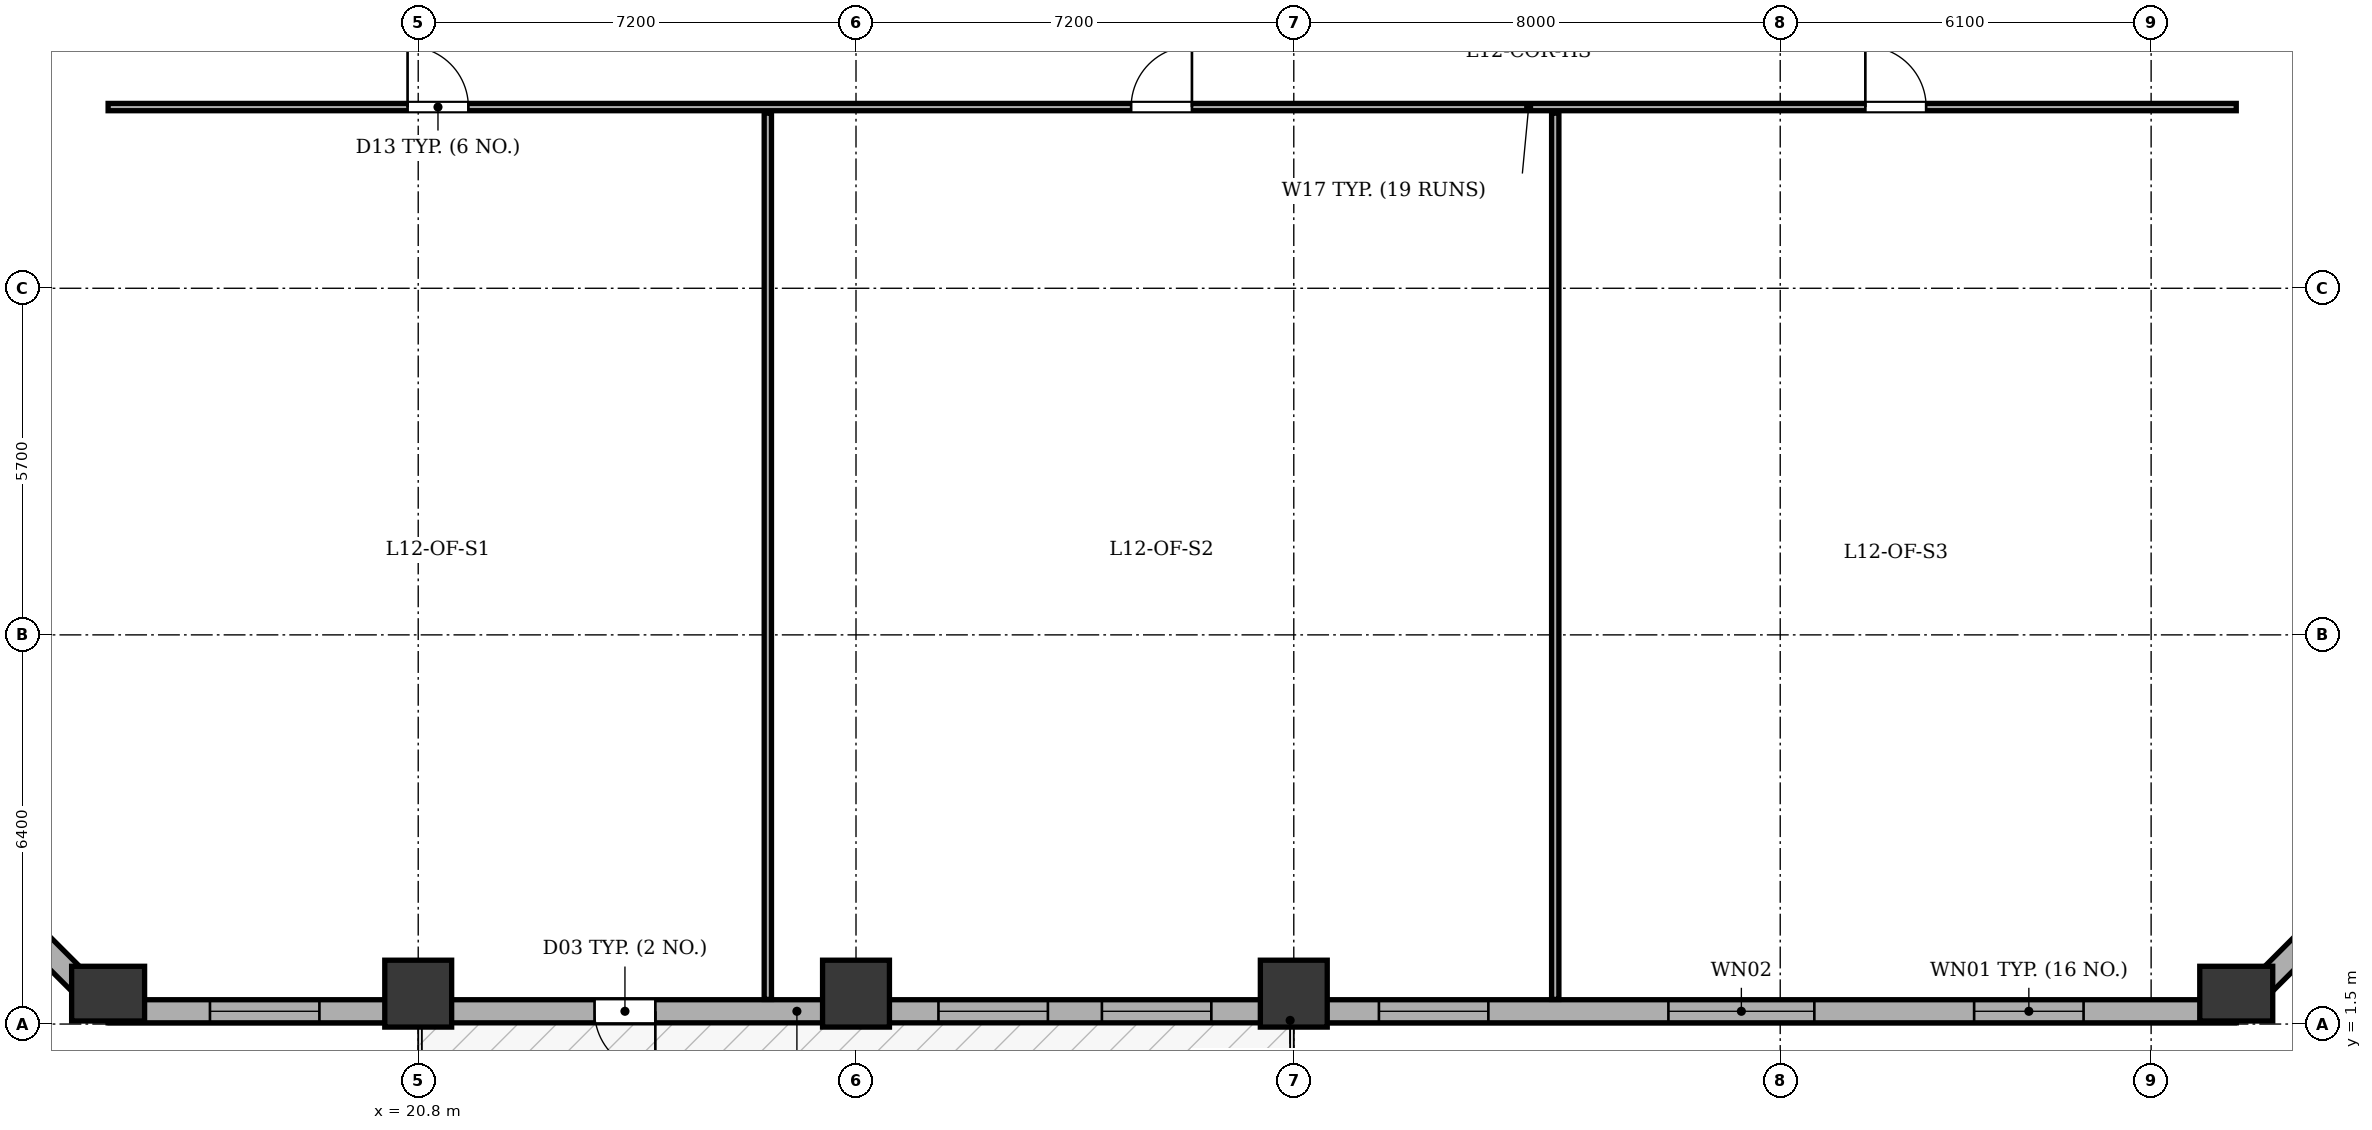
"""IFC4 building model, lengths in metres.
Left out: names, types, materials, properties, quantities, classifications, styles, units other than length and angle.
Written with IfcOpenShell. Run it as: python <this file> out.ifc"""

import sys

from ifc_helpers import new_model, si_unit, direction, frame, frame_2d, origin, origin_2d, place, context, subcontext, project, spatial, rectangle, extrude, element, fill, save


model = new_model("IFC4")
c1 = context("Model", 3, precision=1e-05, world=origin(), true_north=direction((0.0, 1.0)))
c2 = subcontext(c1, "Body", "Model", "MODEL_VIEW")
j1 = project(units=[si_unit("LENGTHUNIT", "METRE"), si_unit("PLANEANGLEUNIT", "RADIAN")], contexts=[c1])
p1 = place(None, origin())
s1 = spatial("IfcSite", under=j1, at=p1, CompositionType="ELEMENT")
p2 = place(p1, origin())
s2 = spatial("IfcBuilding", under=s1, at=p2, CompositionType="ELEMENT")
p3 = place(p2, frame((0.0, 0.0, 51.6)))
s3 = spatial("IfcBuildingStorey", under=s2, at=p3, CompositionType="ELEMENT", Elevation=51.6)
p4 = place(p3, frame((15.7, 2.0, 0.0), z_axis=(0.0, 0.0, 1.0), x_axis=(1.0, 0.0, 0.0)))
e1 = element("IfcColumn", 1, at=p4, inside=s3, PredefinedType="COLUMN", context=c2, shape_type="SweptSolid", body=[
    extrude(rectangle(XDim=0.9, YDim=1.2, at=origin_2d()), origin(), (0.0, 0.0, 1.0), 3.9),
])
for number, where, z_axis, x_axis in (
    (2, (20.8, 2.0, 0.0), (0.0, 0.0, 1.0), (1.0, 0.0, 0.0)),
    (3, (28.0, 2.0, 0.0), (0.0, 0.0, 1.0), (1.0, 0.0, 0.0)),
    (4, (35.2, 2.0, 0.0), (0.0, 0.0, 1.0), (1.0, 0.0, 0.0)),
):
    element("IfcColumn", number, at=place(p3, frame(where, z_axis=z_axis, x_axis=x_axis)), inside=s3, PredefinedType="COLUMN", context=c2, shape_type="SweptSolid", body=[
        extrude(rectangle(XDim=1.1, YDim=1.1, at=origin_2d()), origin(), (0.0, 0.0, 1.0), 3.9),
    ])
p5 = place(p3, frame((50.7, 2.0, 0.0), z_axis=(0.0, 0.0, 1.0), x_axis=(1.0, 0.0, 0.0)))
e5 = element("IfcColumn", 5, at=p5, inside=s3, PredefinedType="COLUMN", context=c2, shape_type="SweptSolid", body=[
    extrude(rectangle(XDim=0.9, YDim=1.2, at=origin_2d()), origin(), (0.0, 0.0, 1.0), 3.9),
])
p6 = place(p3, frame((50.7, 1.71, 0.0), z_axis=(0.0, 0.0, 1.0), x_axis=(-1.0, 0.0, 0.0)))
e6 = element("IfcWall", 6, at=p6, inside=s3, PredefinedType="STANDARD", context=c2, shape_type="SweptSolid", body=[
    extrude(rectangle(XDim=35.0, YDim=0.38, at=frame_2d((17.5, 0.0))), origin(), (0.0, 0.0, 1.0), 3.135),
])
p7 = place(p6, frame((26.0, 0.0, 0.0)))
e7 = element("IfcOpeningElement", 7, at=p7, cuts=e6, PredefinedType="OPENING", context=c2, shape_type="SweptSolid", body=[
    extrude(rectangle(XDim=1.0, YDim=2.02, at=frame_2d((0.5, 1.01))), frame((0.0, 0.2, 0.0), z_axis=(0.0, -1.0, 0.0), x_axis=(1.0, 0.0, 0.0)), (0.0, 0.0, 1.0), 0.4),
])
p8 = place(p6, frame((2.511, 0.0, 0.8)))
e8 = element("IfcOpeningElement", 8, at=p8, cuts=e6, PredefinedType="OPENING", context=c2, shape_type="SweptSolid", body=[
    extrude(rectangle(XDim=1.8, YDim=1.9, at=frame_2d((0.9, 0.95))), frame((0.0, 0.2, 0.0), z_axis=(0.0, -1.0, 0.0), x_axis=(1.0, 0.0, 0.0)), (0.0, 0.0, 1.0), 0.4),
])
p9 = place(p6, frame((6.939, 0.0, 0.8)))
e9 = element("IfcOpeningElement", 9, at=p9, cuts=e6, PredefinedType="OPENING", context=c2, shape_type="SweptSolid", body=[
    extrude(rectangle(XDim=2.4, YDim=1.9, at=frame_2d((1.2, 0.95))), frame((0.0, 0.2, 0.0), z_axis=(0.0, -1.0, 0.0), x_axis=(1.0, 0.0, 0.0)), (0.0, 0.0, 1.0), 0.4),
])
p10 = place(p6, frame((12.3, 0.0, 0.8)))
e10 = element("IfcOpeningElement", 10, at=p10, cuts=e6, PredefinedType="OPENING", context=c2, shape_type="SweptSolid", body=[
    extrude(rectangle(XDim=1.8, YDim=1.9, at=frame_2d((0.9, 0.95))), frame((0.0, 0.2, 0.0), z_axis=(0.0, -1.0, 0.0), x_axis=(1.0, 0.0, 0.0)), (0.0, 0.0, 1.0), 0.4),
])
p11 = place(p6, frame((16.856, 0.0, 0.8)))
e11 = element("IfcOpeningElement", 11, at=p11, cuts=e6, PredefinedType="OPENING", context=c2, shape_type="SweptSolid", body=[
    extrude(rectangle(XDim=1.8, YDim=1.9, at=frame_2d((0.9, 0.95))), frame((0.0, 0.2, 0.0), z_axis=(0.0, -1.0, 0.0), x_axis=(1.0, 0.0, 0.0)), (0.0, 0.0, 1.0), 0.4),
])
p12 = place(p6, frame((19.544, 0.0, 0.8)))
e12 = element("IfcOpeningElement", 12, at=p12, cuts=e6, PredefinedType="OPENING", context=c2, shape_type="SweptSolid", body=[
    extrude(rectangle(XDim=1.8, YDim=1.9, at=frame_2d((0.9, 0.95))), frame((0.0, 0.2, 0.0), z_axis=(0.0, -1.0, 0.0), x_axis=(1.0, 0.0, 0.0)), (0.0, 0.0, 1.0), 0.4),
])
p13 = place(p6, frame((31.525, 0.0, 0.8)))
e13 = element("IfcOpeningElement", 13, at=p13, cuts=e6, PredefinedType="OPENING", context=c2, shape_type="SweptSolid", body=[
    extrude(rectangle(XDim=1.8, YDim=1.9, at=frame_2d((0.9, 0.95))), frame((0.0, 0.2, 0.0), z_axis=(0.0, -1.0, 0.0), x_axis=(1.0, 0.0, 0.0)), (0.0, 0.0, 1.0), 0.4),
])
p14 = place(p3, frame((15.7, 1.71, 0.0), z_axis=(0.0, 0.0, 1.0), x_axis=(-0.707106781187, 0.707106781187, 0.0)))
e14 = element("IfcWall", 14, at=p14, inside=s3, PredefinedType="STANDARD", context=c2, shape_type="SweptSolid", body=[
    extrude(rectangle(XDim=6.774, YDim=0.38, at=frame_2d((3.387, 0.0))), origin(), (0.0, 0.0, 1.0), 3.135),
])
p15 = place(p14, frame((2.687, 0.0, 0.8)))
e15 = element("IfcOpeningElement", 15, at=p15, cuts=e14, PredefinedType="OPENING", context=c2, shape_type="SweptSolid", body=[
    extrude(rectangle(XDim=1.4, YDim=1.65, at=frame_2d((0.7, 0.825))), frame((0.0, 0.2, 0.0), z_axis=(0.0, -1.0, 0.0), x_axis=(1.0, 0.0, 0.0)), (0.0, 0.0, 1.0), 0.4),
])
p16 = place(p3, frame((55.49, 6.5, 0.0), z_axis=(0.0, 0.0, 1.0), x_axis=(-0.707106781187, -0.707106781187, 0.0)))
e16 = element("IfcWall", 16, at=p16, inside=s3, PredefinedType="STANDARD", context=c2, shape_type="SweptSolid", body=[
    extrude(rectangle(XDim=6.774, YDim=0.38, at=frame_2d((3.387, 0.0))), origin(), (0.0, 0.0, 1.0), 3.135),
])
p17 = place(p16, frame((2.687, 0.0, 0.8)))
e17 = element("IfcOpeningElement", 17, at=p17, cuts=e16, PredefinedType="OPENING", context=c2, shape_type="SweptSolid", body=[
    extrude(rectangle(XDim=1.4, YDim=1.65, at=frame_2d((0.7, 0.825))), frame((0.0, 0.2, 0.0), z_axis=(0.0, -1.0, 0.0), x_axis=(1.0, 0.0, 0.0)), (0.0, 0.0, 1.0), 0.4),
])
p18 = place(p3, frame((15.7, 16.58, 0.0), z_axis=(0.0, 0.0, 1.0), x_axis=(1.0, 0.0, 0.0)))
e18 = element("IfcWall", 18, at=p18, inside=s3, PredefinedType="PARTITIONING", context=c2, shape_type="SweptSolid", body=[
    extrude(rectangle(XDim=35.0, YDim=0.12, at=frame_2d((17.5, 0.0))), origin(), (0.0, 0.0, 1.0), 3.6),
])
p19 = place(p18, frame((4.925, 0.0, 0.0)))
e19 = element("IfcOpeningElement", 19, at=p19, cuts=e18, PredefinedType="OPENING", context=c2, shape_type="SweptSolid", body=[
    extrude(rectangle(XDim=1.0, YDim=2.1, at=frame_2d((0.5, 1.05))), frame((0.0, 0.07, 0.0), z_axis=(0.0, -1.0, 0.0), x_axis=(1.0, 0.0, 0.0)), (0.0, 0.0, 1.0), 0.14),
])
p20 = place(p18, frame((16.825, 0.0, 0.0)))
e20 = element("IfcOpeningElement", 20, at=p20, cuts=e18, PredefinedType="OPENING", context=c2, shape_type="SweptSolid", body=[
    extrude(rectangle(XDim=1.0, YDim=2.1, at=frame_2d((0.5, 1.05))), frame((0.0, 0.07, 0.0), z_axis=(0.0, -1.0, 0.0), x_axis=(1.0, 0.0, 0.0)), (0.0, 0.0, 1.0), 0.14),
])
p21 = place(p18, frame((28.9, 0.0, 0.0)))
e21 = element("IfcOpeningElement", 21, at=p21, cuts=e18, PredefinedType="OPENING", context=c2, shape_type="SweptSolid", body=[
    extrude(rectangle(XDim=1.0, YDim=2.1, at=frame_2d((0.5, 1.05))), frame((0.0, 0.07, 0.0), z_axis=(0.0, -1.0, 0.0), x_axis=(1.0, 0.0, 0.0)), (0.0, 0.0, 1.0), 0.14),
])
for number, where, z_axis, x_axis in (
    (22, (26.55, 1.905, 0.0), (0.0, 0.0, 1.0), (0.0, 1.0, 0.0)),
    (23, (39.5, 1.905, 0.0), (0.0, 0.0, 1.0), (0.0, 1.0, 0.0)),
):
    element("IfcWall", number, at=place(p3, frame(where, z_axis=z_axis, x_axis=x_axis)), inside=s3, PredefinedType="PARTITIONING", context=c2, shape_type="SweptSolid", body=[
        extrude(rectangle(XDim=14.575, YDim=0.12, at=frame_2d((7.288, 0.0))), origin(), (0.0, 0.0, 1.0), 3.6),
    ])
p22 = place(p7, origin())
e24 = element("IfcDoor", 24, at=p22, inside=s3, OperationType="SINGLE_SWING_LEFT", PredefinedType="DOOR", context=c2, shape_type="SweptSolid", body=[
    extrude(rectangle(XDim=1.0, YDim=2.02, at=frame_2d((0.5, 1.01))), frame((0.0, 0.025, 0.0), z_axis=(0.0, -1.0, 0.0), x_axis=(1.0, 0.0, 0.0)), (0.0, 0.0, 1.0), 0.05),
])
fill(e7, e24)
p23 = place(p8, origin())
e25 = element("IfcWindow", 25, at=p23, inside=s3, PartitioningType="SINGLE_PANEL", PredefinedType="WINDOW", context=c2, shape_type="SweptSolid", body=[
    extrude(rectangle(XDim=1.8, YDim=1.9, at=frame_2d((0.9, 0.95))), frame((0.0, -0.01, 0.0), z_axis=(0.0, -1.0, 0.0), x_axis=(1.0, 0.0, 0.0)), (0.0, 0.0, 1.0), 0.06),
])
fill(e8, e25)
p24 = place(p9, origin())
e26 = element("IfcWindow", 26, at=p24, inside=s3, PartitioningType="SINGLE_PANEL", PredefinedType="WINDOW", context=c2, shape_type="SweptSolid", body=[
    extrude(rectangle(XDim=2.4, YDim=1.9, at=frame_2d((1.2, 0.95))), frame((0.0, -0.01, 0.0), z_axis=(0.0, -1.0, 0.0), x_axis=(1.0, 0.0, 0.0)), (0.0, 0.0, 1.0), 0.06),
])
fill(e9, e26)
p25 = place(p10, origin())
e27 = element("IfcWindow", 27, at=p25, inside=s3, PartitioningType="SINGLE_PANEL", PredefinedType="WINDOW", context=c2, shape_type="SweptSolid", body=[
    extrude(rectangle(XDim=1.8, YDim=1.9, at=frame_2d((0.9, 0.95))), frame((0.0, -0.01, 0.0), z_axis=(0.0, -1.0, 0.0), x_axis=(1.0, 0.0, 0.0)), (0.0, 0.0, 1.0), 0.06),
])
fill(e10, e27)
p26 = place(p11, origin())
e28 = element("IfcWindow", 28, at=p26, inside=s3, PartitioningType="SINGLE_PANEL", PredefinedType="WINDOW", context=c2, shape_type="SweptSolid", body=[
    extrude(rectangle(XDim=1.8, YDim=1.9, at=frame_2d((0.9, 0.95))), frame((0.0, -0.01, 0.0), z_axis=(0.0, -1.0, 0.0), x_axis=(1.0, 0.0, 0.0)), (0.0, 0.0, 1.0), 0.06),
])
fill(e11, e28)
p27 = place(p12, origin())
e29 = element("IfcWindow", 29, at=p27, inside=s3, PartitioningType="SINGLE_PANEL", PredefinedType="WINDOW", context=c2, shape_type="SweptSolid", body=[
    extrude(rectangle(XDim=1.8, YDim=1.9, at=frame_2d((0.9, 0.95))), frame((0.0, -0.01, 0.0), z_axis=(0.0, -1.0, 0.0), x_axis=(1.0, 0.0, 0.0)), (0.0, 0.0, 1.0), 0.06),
])
fill(e12, e29)
p28 = place(p13, origin())
e30 = element("IfcWindow", 30, at=p28, inside=s3, PartitioningType="SINGLE_PANEL", PredefinedType="WINDOW", context=c2, shape_type="SweptSolid", body=[
    extrude(rectangle(XDim=1.8, YDim=1.9, at=frame_2d((0.9, 0.95))), frame((0.0, -0.01, 0.0), z_axis=(0.0, -1.0, 0.0), x_axis=(1.0, 0.0, 0.0)), (0.0, 0.0, 1.0), 0.06),
])
fill(e13, e30)
p29 = place(p19, origin())
e31 = element("IfcDoor", 31, at=p29, inside=s3, OperationType="SINGLE_SWING_LEFT", PredefinedType="DOOR", context=c2, shape_type="SweptSolid", body=[
    extrude(rectangle(XDim=1.0, YDim=2.1, at=frame_2d((0.5, 1.05))), frame((0.0, 0.025, 0.0), z_axis=(0.0, -1.0, 0.0), x_axis=(1.0, 0.0, 0.0)), (0.0, 0.0, 1.0), 0.05),
])
fill(e19, e31)
p30 = place(p20, origin())
e32 = element("IfcDoor", 32, at=p30, inside=s3, OperationType="SINGLE_SWING_RIGHT", PredefinedType="DOOR", context=c2, shape_type="SweptSolid", body=[
    extrude(rectangle(XDim=1.0, YDim=2.1, at=frame_2d((0.5, 1.05))), frame((0.0, 0.025, 0.0), z_axis=(0.0, -1.0, 0.0), x_axis=(1.0, 0.0, 0.0)), (0.0, 0.0, 1.0), 0.05),
])
fill(e20, e32)
p31 = place(p21, origin())
e33 = element("IfcDoor", 33, at=p31, inside=s3, OperationType="SINGLE_SWING_LEFT", PredefinedType="DOOR", context=c2, shape_type="SweptSolid", body=[
    extrude(rectangle(XDim=1.0, YDim=2.1, at=frame_2d((0.5, 1.05))), frame((0.0, 0.025, 0.0), z_axis=(0.0, -1.0, 0.0), x_axis=(1.0, 0.0, 0.0)), (0.0, 0.0, 1.0), 0.05),
])
fill(e21, e33)
save(model, sys.argv[1])
